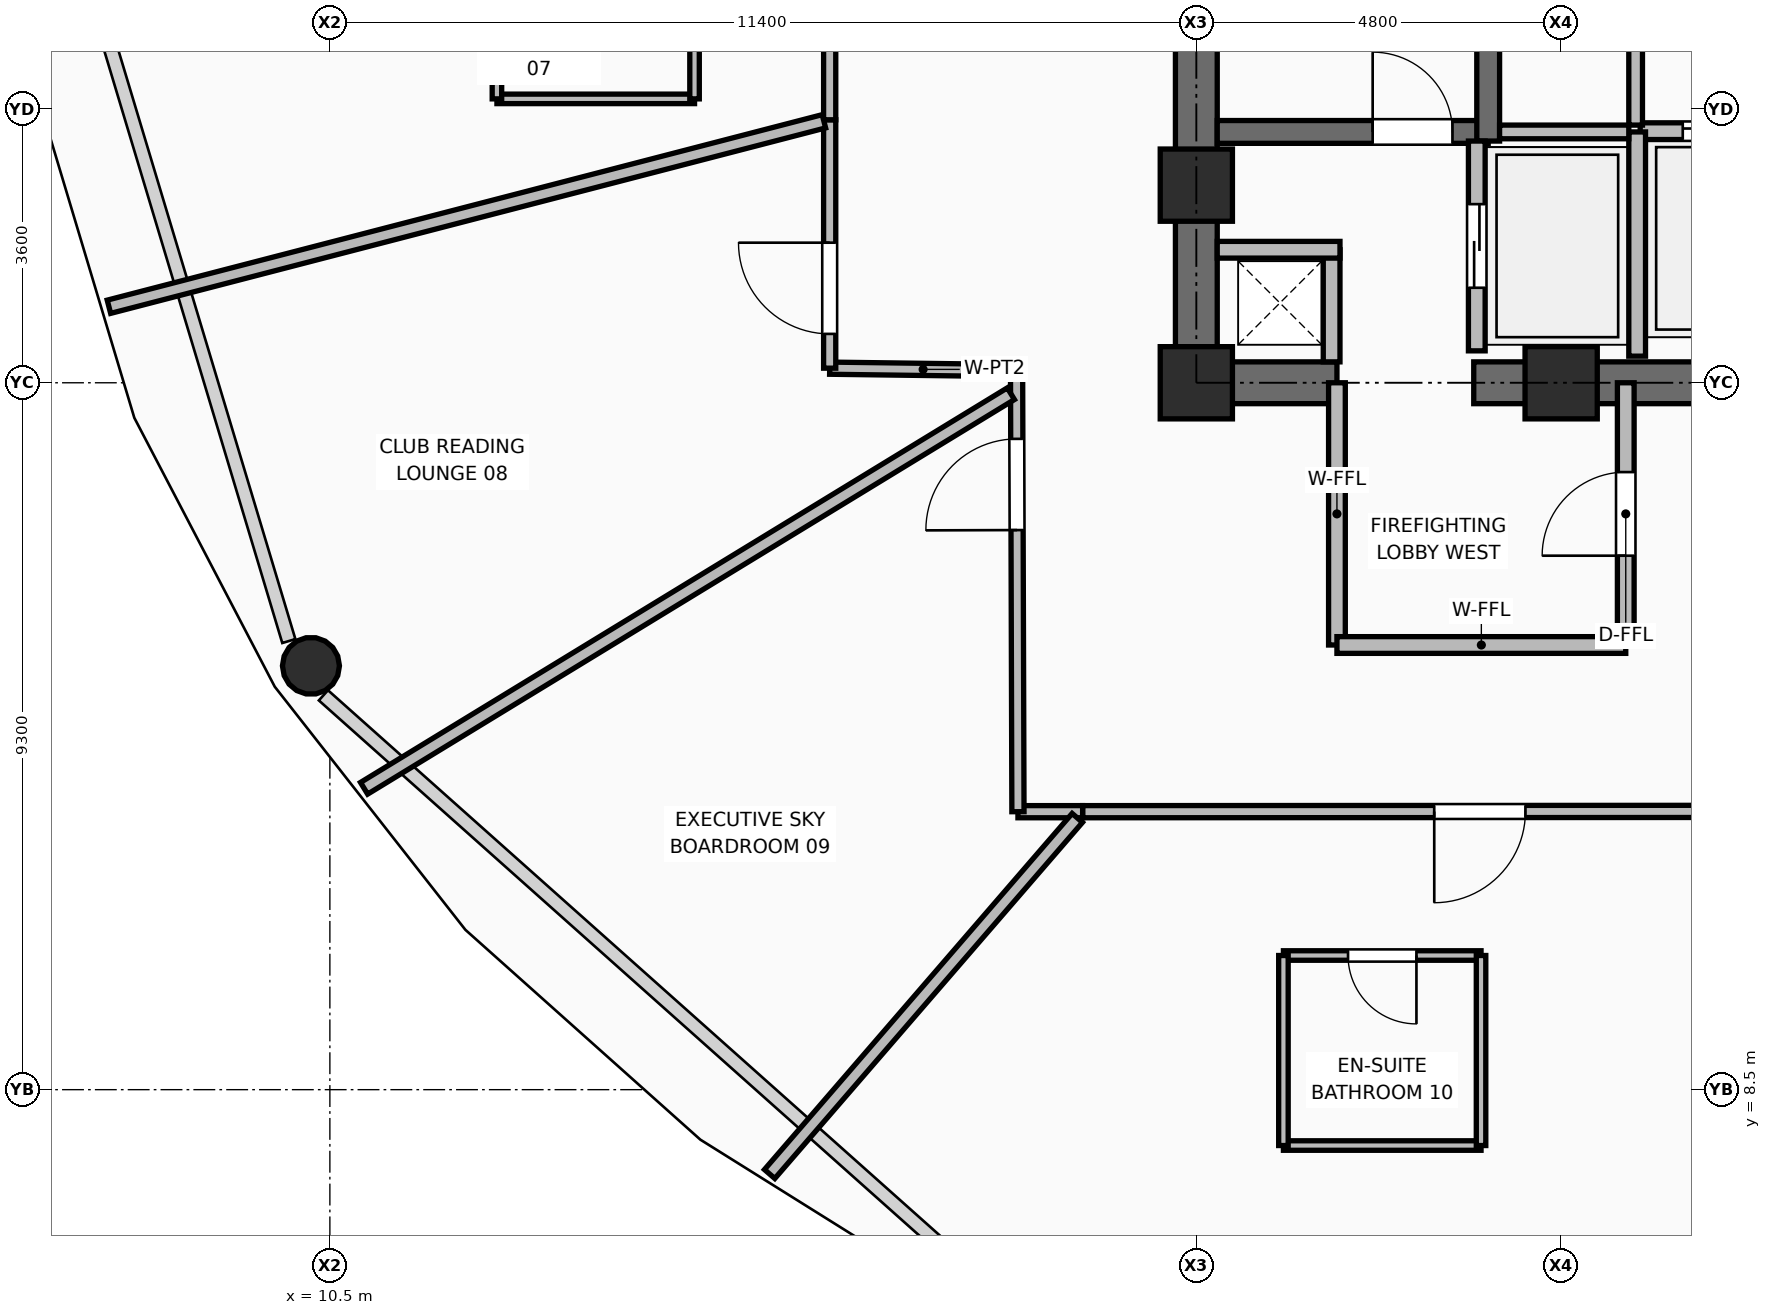
"""IFC4 building model, lengths in metres.
Left out: names, types, materials, properties, quantities, classifications, styles, units other than length and angle.
Written with IfcOpenShell. Run it as: python <this file> out.ifc"""

import sys

from ifc_helpers import new_model, si_unit, direction, frame, frame_2d, origin, origin_2d, place, context, subcontext, project, spatial, rectangle, hollow_circle, extrude, element, fill, save


model = new_model("IFC4")
c1 = context("Model", 3, precision=1e-05, world=origin(), true_north=direction((0.0, 1.0)))
c2 = subcontext(c1, "Body", "Model", "MODEL_VIEW")
j1 = project(units=[si_unit("LENGTHUNIT", "METRE"), si_unit("PLANEANGLEUNIT", "RADIAN")], contexts=[c1])
p1 = place(None, origin())
s1 = spatial("IfcSite", under=j1, at=p1, CompositionType="ELEMENT")
p2 = place(p1, origin())
s2 = spatial("IfcBuilding", under=s1, at=p2, CompositionType="ELEMENT")
p3 = place(p2, frame((0.0, 0.0, 168.45)))
s3 = spatial("IfcBuildingStorey", under=s2, at=p3, CompositionType="ELEMENT", Elevation=168.45)
for number, where, z_axis, x_axis in (
    (1, (21.9, 17.8, 0.0), (0.0, 0.0, 1.0), (1.0, 0.0, 0.0)),
    (2, (26.7, 17.8, 0.0), (0.0, 0.0, 1.0), (1.0, 0.0, 0.0)),
    (3, (21.9, 20.4, 0.0), (0.0, 0.0, 1.0), (1.0, 0.0, 0.0)),
):
    element("IfcColumn", number, at=place(p3, frame(where, z_axis=z_axis, x_axis=x_axis)), inside=s3, PredefinedType="COLUMN", context=c2, shape_type="SweptSolid", body=[
        extrude(rectangle(XDim=0.95, YDim=0.95, at=origin_2d()), origin(), (0.0, 0.0, 1.0), 3.75),
    ])
p4 = place(p3, frame((10.251, 14.076, 0.0), z_axis=(0.0, 0.0, 1.0), x_axis=(1.0, 0.0, 0.0)))
e4 = element("IfcColumn", 4, at=p4, inside=s3, PredefinedType="COLUMN", context=c2, shape_type="SweptSolid", body=[
    extrude(hollow_circle(Radius=0.375, WallThickness=0.035, at=origin_2d()), origin(), (0.0, 0.0, 1.0), 3.57),
])
p5 = place(p3, frame((21.625, 17.8, 0.0), z_axis=(0.0, 0.0, 1.0), x_axis=(1.0, 0.0, 0.0)))
e5 = element("IfcWall", 5, at=p5, inside=s3, PredefinedType="SHEAR", context=c2, shape_type="SweptSolid", body=[
    extrude(rectangle(XDim=2.125, YDim=0.55, at=frame_2d((1.062, 0.0))), origin(), (0.0, 0.0, 1.0), 3.57),
])
p6 = place(p3, frame((25.55, 17.8, 0.0), z_axis=(0.0, 0.0, 1.0), x_axis=(1.0, 0.0, 0.0)))
e6 = element("IfcWall", 6, at=p6, inside=s3, PredefinedType="SHEAR", context=c2, shape_type="SweptSolid", body=[
    extrude(rectangle(XDim=6.9, YDim=0.55, at=frame_2d((3.45, 0.0))), origin(), (0.0, 0.0, 1.0), 3.57),
])
p7 = place(p3, frame((21.9, 18.075, 0.0), z_axis=(0.0, 0.0, 1.0), x_axis=(0.0, 1.0, 0.0)))
e7 = element("IfcWall", 7, at=p7, inside=s3, PredefinedType="SHEAR", context=c2, shape_type="SweptSolid", body=[
    extrude(rectangle(XDim=14.1, YDim=0.55, at=frame_2d((7.05, 0.0))), origin(), (0.0, 0.0, 1.0), 3.57),
])
p8 = place(p3, frame((22.175, 21.1, 0.0), z_axis=(0.0, 0.0, 1.0), x_axis=(1.0, 0.0, 0.0)))
e8 = element("IfcWall", 8, at=p8, inside=s3, PredefinedType="SHEAR", context=c2, shape_type="SweptSolid", body=[
    extrude(rectangle(XDim=3.565, YDim=0.3, at=frame_2d((1.782, 0.0))), origin(), (0.0, 0.0, 1.0), 3.57),
])
p9 = place(p8, frame((2.045, 0.0, 0.0)))
e9 = element("IfcOpeningElement", 9, at=p9, cuts=e8, PredefinedType="OPENING", context=c2, shape_type="SweptSolid", body=[
    extrude(rectangle(XDim=1.05, YDim=2.1, at=frame_2d((0.525, 1.05))), frame((0.0, 0.16, 0.0), z_axis=(0.0, -1.0, 0.0), x_axis=(1.0, 0.0, 0.0)), (0.0, 0.0, 1.0), 0.32),
])
p10 = place(p3, frame((25.74, 20.98, 0.0), z_axis=(0.0, 0.0, 1.0), x_axis=(0.0, 1.0, 0.0)))
e10 = element("IfcWall", 10, at=p10, inside=s3, PredefinedType="SHEAR", context=c2, shape_type="SweptSolid", body=[
    extrude(rectangle(XDim=7.99, YDim=0.3, at=frame_2d((3.995, 0.0))), origin(), (0.0, 0.0, 1.0), 3.57),
])
p11 = place(p3, frame((23.68, 18.075, 0.0), z_axis=(0.0, 0.0, 1.0), x_axis=(0.0, 1.0, 0.0)))
e11 = element("IfcWall", 11, at=p11, inside=s3, PredefinedType="PARTITIONING", context=c2, shape_type="SweptSolid", body=[
    extrude(rectangle(XDim=1.475, YDim=0.22, at=frame_2d((0.738, 0.0))), origin(), (0.0, 0.0, 1.0), 3.55),
])
p12 = place(p3, frame((22.175, 19.55, 0.0), z_axis=(0.0, 0.0, 1.0), x_axis=(1.0, 0.0, 0.0)))
e12 = element("IfcWall", 12, at=p12, inside=s3, PredefinedType="PARTITIONING", context=c2, shape_type="SweptSolid", body=[
    extrude(rectangle(XDim=1.615, YDim=0.22, at=frame_2d((0.808, 0.0))), origin(), (0.0, 0.0, 1.0), 2.595),
])
p13 = place(p3, frame((25.59, 18.22, 0.0), z_axis=(0.0, 0.0, 1.0), x_axis=(0.0, 1.0, 0.0)))
e13 = element("IfcWall", 13, at=p13, inside=s3, PredefinedType="PARTITIONING", context=c2, shape_type="SweptSolid", body=[
    extrude(rectangle(XDim=2.76, YDim=0.22, at=frame_2d((1.38, 0.0))), origin(), (0.0, 0.0, 1.0), 3.55),
])
p14 = place(p13, frame((0.83, 0.0, 0.0)))
e14 = element("IfcOpeningElement", 14, at=p14, cuts=e13, PredefinedType="OPENING", context=c2, shape_type="SweptSolid", body=[
    extrude(rectangle(XDim=1.1, YDim=2.2, at=frame_2d((0.55, 1.1))), frame((0.0, 0.12, 0.0), z_axis=(0.0, -1.0, 0.0), x_axis=(1.0, 0.0, 0.0)), (0.0, 0.0, 1.0), 0.24),
])
p15 = place(p3, frame((27.74, 21.11, 0.0), z_axis=(0.0, 0.0, 1.0), x_axis=(1.0, 0.0, 0.0)))
e15 = element("IfcWall", 15, at=p15, inside=s3, PredefinedType="PARTITIONING", context=c2, shape_type="SweptSolid", body=[
    extrude(rectangle(XDim=2.22, YDim=0.22, at=frame_2d((1.11, 0.0))), origin(), (0.0, 0.0, 1.0), 3.55),
])
p16 = place(p15, frame((0.56, 0.0, 0.0)))
e16 = element("IfcOpeningElement", 16, at=p16, cuts=e15, PredefinedType="OPENING", context=c2, shape_type="SweptSolid", body=[
    extrude(rectangle(XDim=1.1, YDim=2.2, at=frame_2d((0.55, 1.1))), frame((0.0, 0.12, 0.0), z_axis=(0.0, -1.0, 0.0), x_axis=(1.0, 0.0, 0.0)), (0.0, 0.0, 1.0), 0.24),
])
p17 = place(p3, frame((27.7, 18.15, 0.0), z_axis=(0.0, 0.0, 1.0), x_axis=(0.0, 1.0, 0.0)))
e17 = element("IfcWall", 17, at=p17, inside=s3, PredefinedType="PARTITIONING", context=c2, shape_type="SweptSolid", body=[
    extrude(rectangle(XDim=2.95, YDim=0.22, at=frame_2d((1.475, 0.0))), origin(), (0.0, 0.0, 1.0), 3.55),
])
p18 = place(p3, frame((25.89, 21.1, 0.0), z_axis=(0.0, 0.0, 1.0), x_axis=(1.0, 0.0, 0.0)))
e18 = element("IfcWall", 18, at=p18, inside=s3, PredefinedType="PARTITIONING", context=c2, shape_type="SweptSolid", body=[
    extrude(rectangle(XDim=1.7, YDim=0.18, at=frame_2d((0.85, 0.0))), origin(), (0.0, 0.0, 1.0), 3.55),
])
p19 = place(p3, frame((27.68, 21.19, 0.0), z_axis=(0.0, 0.0, 1.0), x_axis=(0.0, 1.0, 0.0)))
e19 = element("IfcWall", 19, at=p19, inside=s3, PredefinedType="PARTITIONING", context=c2, shape_type="SweptSolid", body=[
    extrude(rectangle(XDim=1.39, YDim=0.18, at=frame_2d((0.695, 0.0))), origin(), (0.0, 0.0, 1.0), 3.55),
])
p20 = place(p3, frame((23.75, 14.35, 0.0), z_axis=(0.0, 0.0, 1.0), x_axis=(0.0, 1.0, 0.0)))
e20 = element("IfcWall", 20, at=p20, inside=s3, PredefinedType="PARTITIONING", context=c2, shape_type="SweptSolid", body=[
    extrude(rectangle(XDim=3.45, YDim=0.22, at=frame_2d((1.725, 0.0))), origin(), (0.0, 0.0, 1.0), 3.006),
])
p21 = place(p3, frame((23.75, 14.35, 0.0), z_axis=(0.0, 0.0, 1.0), x_axis=(1.0, 0.0, 0.0)))
e21 = element("IfcWall", 21, at=p21, inside=s3, PredefinedType="PARTITIONING", context=c2, shape_type="SweptSolid", body=[
    extrude(rectangle(XDim=3.8, YDim=0.22, at=frame_2d((1.9, 0.0))), origin(), (0.0, 0.0, 1.0), 3.55),
])
p22 = place(p3, frame((27.55, 14.35, 0.0), z_axis=(0.0, 0.0, 1.0), x_axis=(0.0, 1.0, 0.0)))
e22 = element("IfcWall", 22, at=p22, inside=s3, PredefinedType="PARTITIONING", context=c2, shape_type="SweptSolid", body=[
    extrude(rectangle(XDim=3.45, YDim=0.22, at=frame_2d((1.725, 0.0))), origin(), (0.0, 0.0, 1.0), 3.006),
])
p23 = place(p22, frame((1.175, 0.0, 0.0)))
e23 = element("IfcOpeningElement", 23, at=p23, cuts=e22, PredefinedType="OPENING", context=c2, shape_type="SweptSolid", body=[
    extrude(rectangle(XDim=1.1, YDim=2.1, at=frame_2d((0.55, 1.05))), frame((0.0, 0.12, 0.0), z_axis=(0.0, -1.0, 0.0), x_axis=(1.0, 0.0, 0.0)), (0.0, 0.0, 1.0), 0.24),
])
p24 = place(p3, frame((31.004, 12.162, 0.0), z_axis=(0.0, 0.0, 1.0), x_axis=(-0.999999883026, -0.000483681451, 0.0)))
e24 = element("IfcWall", 24, at=p24, inside=s3, PredefinedType="PARTITIONING", context=c2, shape_type="SweptSolid", body=[
    extrude(rectangle(XDim=10.6, YDim=0.16, at=frame_2d((5.3, 0.0))), origin(), (0.0, 0.0, 1.0), 3.006),
])
p25 = place(p24, frame((4.774, 0.0, 0.0)))
e25 = element("IfcOpeningElement", 25, at=p25, cuts=e24, PredefinedType="OPENING", context=c2, shape_type="SweptSolid", body=[
    extrude(rectangle(XDim=1.2, YDim=2.1, at=frame_2d((0.6, 1.05))), frame((0.0, 0.09, 0.0), z_axis=(0.0, -1.0, 0.0), x_axis=(1.0, 0.0, 0.0)), (0.0, 0.0, 1.0), 0.18),
])
p26 = place(p3, frame((20.404, 12.157, 0.0), z_axis=(0.0, 0.0, 1.0), x_axis=(-1.0, 0.0, 0.0)))
e26 = element("IfcWall", 26, at=p26, inside=s3, PredefinedType="PARTITIONING", context=c2, shape_type="SweptSolid", body=[
    extrude(rectangle(XDim=0.851, YDim=0.16, at=frame_2d((0.426, 0.0))), origin(), (0.0, 0.0, 1.0), 3.006),
])
p27 = place(p3, frame((19.553, 12.157, 0.0), z_axis=(0.0, 0.0, 1.0), x_axis=(-0.003113283747, 0.99999515372, 0.0)))
e27 = element("IfcWall", 27, at=p27, inside=s3, PredefinedType="PARTITIONING", context=c2, shape_type="SweptSolid", body=[
    extrude(rectangle(XDim=5.803, YDim=0.16, at=frame_2d((2.901, 0.0))), origin(), (0.0, 0.0, 1.0), 3.006),
])
p28 = place(p27, frame((3.705, 0.0, 0.0)))
e28 = element("IfcOpeningElement", 28, at=p28, cuts=e27, PredefinedType="OPENING", context=c2, shape_type="SweptSolid", body=[
    extrude(rectangle(XDim=1.2, YDim=2.1, at=frame_2d((0.6, 1.05))), frame((0.0, 0.09, 0.0), z_axis=(0.0, -1.0, 0.0), x_axis=(1.0, 0.0, 0.0)), (0.0, 0.0, 1.0), 0.18),
])
p29 = place(p3, frame((19.535, 17.96, 0.0), z_axis=(0.0, 0.0, 1.0), x_axis=(-0.999915428104, 0.013005254277, 0.0)))
e29 = element("IfcWall", 29, at=p29, inside=s3, PredefinedType="PARTITIONING", context=c2, shape_type="SweptSolid", body=[
    extrude(rectangle(XDim=2.459, YDim=0.16, at=frame_2d((1.229, 0.0))), origin(), (0.0, 0.0, 1.0), 3.55),
])
p30 = place(p3, frame((17.076, 17.992, 0.0), z_axis=(0.0, 0.0, 1.0), x_axis=(0.0, 1.0, 0.0)))
e30 = element("IfcWall", 30, at=p30, inside=s3, PredefinedType="PARTITIONING", context=c2, shape_type="SweptSolid", body=[
    extrude(rectangle(XDim=3.268, YDim=0.16, at=frame_2d((1.634, 0.0))), origin(), (0.0, 0.0, 1.0), 3.55),
])
p31 = place(p30, frame((0.451, 0.0, 0.0)))
e31 = element("IfcOpeningElement", 31, at=p31, cuts=e30, PredefinedType="OPENING", context=c2, shape_type="SweptSolid", body=[
    extrude(rectangle(XDim=1.2, YDim=2.1, at=frame_2d((0.6, 1.05))), frame((0.0, 0.09, 0.0), z_axis=(0.0, -1.0, 0.0), x_axis=(1.0, 0.0, 0.0)), (0.0, 0.0, 1.0), 0.18),
])
p32 = place(p3, frame((17.076, 21.26, 0.0), z_axis=(0.0, 0.0, 1.0), x_axis=(0.0, 1.0, 0.0)))
e32 = element("IfcWall", 32, at=p32, inside=s3, PredefinedType="PARTITIONING", context=c2, shape_type="SweptSolid", body=[
    extrude(rectangle(XDim=2.598, YDim=0.16, at=frame_2d((1.299, 0.0))), origin(), (0.0, 0.0, 1.0), 3.006),
])
p33 = place(p3, frame((17.0, 21.24, 0.0), z_axis=(0.0, 0.0, 1.0), x_axis=(-0.96796954255, -0.251067649639, 0.0)))
e33 = element("IfcWall", 33, at=p33, inside=s3, PredefinedType="PARTITIONING", context=c2, shape_type="SweptSolid", body=[
    extrude(rectangle(XDim=9.718, YDim=0.18, at=frame_2d((4.859, 0.0))), origin(), (0.0, 0.0, 1.0), 2.852),
])
p34 = place(p3, frame((19.46, 17.656, 0.0), z_axis=(0.0, 0.0, 1.0), x_axis=(-0.853711993856, -0.520745457537, 0.0)))
e34 = element("IfcWall", 34, at=p34, inside=s3, PredefinedType="PARTITIONING", context=c2, shape_type="SweptSolid", body=[
    extrude(rectangle(XDim=9.968, YDim=0.18, at=frame_2d((4.984, 0.0))), origin(), (0.0, 0.0, 1.0), 2.852),
])
p35 = place(p3, frame((20.334, 12.075, 0.0), z_axis=(0.0, 0.0, 1.0), x_axis=(-0.653796426348, -0.756670491624, 0.0)))
e35 = element("IfcWall", 35, at=p35, inside=s3, PredefinedType="PARTITIONING", context=c2, shape_type="SweptSolid", body=[
    extrude(rectangle(XDim=6.192, YDim=0.18, at=frame_2d((3.096, 0.0))), origin(), (0.0, 0.0, 1.0), 2.852),
])
p36 = place(p3, frame((12.698, 21.535, 0.0), z_axis=(0.0, 0.0, 1.0), x_axis=(1.0, 0.0, 0.0)))
e36 = element("IfcWall", 36, at=p36, inside=s3, PredefinedType="PARTITIONING", context=c2, shape_type="SweptSolid", body=[
    extrude(rectangle(XDim=2.6, YDim=0.125, at=frame_2d((1.3, 0.0))), origin(), (0.0, 0.0, 1.0), 3.55),
])
p37 = place(p3, frame((12.698, 21.535, 0.0), z_axis=(0.0, 0.0, 1.0), x_axis=(0.0, 1.0, 0.0)))
e37 = element("IfcWall", 37, at=p37, inside=s3, PredefinedType="PARTITIONING", context=c2, shape_type="SweptSolid", body=[
    extrude(rectangle(XDim=2.5, YDim=0.125, at=frame_2d((1.25, 0.0))), origin(), (0.0, 0.0, 1.0), 3.006),
])
p38 = place(p3, frame((15.298, 21.535, 0.0), z_axis=(0.0, 0.0, 1.0), x_axis=(0.0, 1.0, 0.0)))
e38 = element("IfcWall", 38, at=p38, inside=s3, PredefinedType="PARTITIONING", context=c2, shape_type="SweptSolid", body=[
    extrude(rectangle(XDim=2.5, YDim=0.125, at=frame_2d((1.25, 0.0))), origin(), (0.0, 0.0, 1.0), 3.006),
])
p39 = place(p38, frame((0.8, 0.0, 0.0)))
e39 = element("IfcOpeningElement", 39, at=p39, cuts=e38, PredefinedType="OPENING", context=c2, shape_type="SweptSolid", body=[
    extrude(rectangle(XDim=0.9, YDim=2.1, at=frame_2d((0.45, 1.05))), frame((0.0, 0.073, 0.0), z_axis=(0.0, -1.0, 0.0), x_axis=(1.0, 0.0, 0.0)), (0.0, 0.0, 1.0), 0.145),
])
p40 = place(p3, frame((23.046, 7.765, 0.0), z_axis=(0.0, 0.0, 1.0), x_axis=(1.0, 0.0, 0.0)))
e40 = element("IfcWall", 40, at=p40, inside=s3, PredefinedType="PARTITIONING", context=c2, shape_type="SweptSolid", body=[
    extrude(rectangle(XDim=2.6, YDim=0.125, at=frame_2d((1.3, 0.0))), origin(), (0.0, 0.0, 1.0), 3.55),
])
p41 = place(p3, frame((23.046, 10.265, 0.0), z_axis=(0.0, 0.0, 1.0), x_axis=(1.0, 0.0, 0.0)))
e41 = element("IfcWall", 41, at=p41, inside=s3, PredefinedType="PARTITIONING", context=c2, shape_type="SweptSolid", body=[
    extrude(rectangle(XDim=2.6, YDim=0.125, at=frame_2d((1.3, 0.0))), origin(), (0.0, 0.0, 1.0), 3.55),
])
p42 = place(p41, frame((0.85, 0.0, 0.0)))
e42 = element("IfcOpeningElement", 42, at=p42, cuts=e41, PredefinedType="OPENING", context=c2, shape_type="SweptSolid", body=[
    extrude(rectangle(XDim=0.9, YDim=2.1, at=frame_2d((0.45, 1.05))), frame((0.0, 0.073, 0.0), z_axis=(0.0, -1.0, 0.0), x_axis=(1.0, 0.0, 0.0)), (0.0, 0.0, 1.0), 0.145),
])
for number, where, z_axis, x_axis in (
    (43, (23.046, 7.765, 0.0), (0.0, 0.0, 1.0), (0.0, 1.0, 0.0)),
    (44, (25.646, 7.765, 0.0), (0.0, 0.0, 1.0), (0.0, 1.0, 0.0)),
):
    element("IfcWall", number, at=place(p3, frame(where, z_axis=z_axis, x_axis=x_axis)), inside=s3, PredefinedType="PARTITIONING", context=c2, shape_type="SweptSolid", body=[
        extrude(rectangle(XDim=2.5, YDim=0.125, at=frame_2d((1.25, 0.0))), origin(), (0.0, 0.0, 1.0), 3.55),
    ])
p43 = place(p9, origin())
e45 = element("IfcDoor", 45, at=p43, inside=s3, OperationType="SINGLE_SWING_LEFT", PredefinedType="DOOR", context=c2, shape_type="SweptSolid", body=[
    extrude(rectangle(XDim=1.05, YDim=2.1, at=frame_2d((0.525, 1.05))), frame((0.0, 0.025, 0.0), z_axis=(0.0, -1.0, 0.0), x_axis=(1.0, 0.0, 0.0)), (0.0, 0.0, 1.0), 0.05),
])
fill(e9, e45)
p44 = place(p14, origin())
e46 = element("IfcDoor", 46, at=p44, inside=s3, OperationType="DOUBLE_DOOR_SLIDING", PredefinedType="DOOR", context=c2, shape_type="SweptSolid", body=[
    extrude(rectangle(XDim=1.1, YDim=2.2, at=frame_2d((0.55, 1.1))), frame((0.0, 0.025, 0.0), z_axis=(0.0, -1.0, 0.0), x_axis=(1.0, 0.0, 0.0)), (0.0, 0.0, 1.0), 0.05),
])
fill(e14, e46)
p45 = place(p16, origin())
e47 = element("IfcDoor", 47, at=p45, inside=s3, OperationType="DOUBLE_DOOR_SLIDING", PredefinedType="DOOR", context=c2, shape_type="SweptSolid", body=[
    extrude(rectangle(XDim=1.1, YDim=2.2, at=frame_2d((0.55, 1.1))), frame((0.0, 0.025, 0.0), z_axis=(0.0, -1.0, 0.0), x_axis=(1.0, 0.0, 0.0)), (0.0, 0.0, 1.0), 0.05),
])
fill(e16, e47)
p46 = place(p23, origin())
e48 = element("IfcDoor", 48, at=p46, inside=s3, OperationType="SINGLE_SWING_LEFT", PredefinedType="DOOR", context=c2, shape_type="SweptSolid", body=[
    extrude(rectangle(XDim=1.1, YDim=2.1, at=frame_2d((0.55, 1.05))), frame((0.0, 0.025, 0.0), z_axis=(0.0, -1.0, 0.0), x_axis=(1.0, 0.0, 0.0)), (0.0, 0.0, 1.0), 0.05),
])
fill(e23, e48)
p47 = place(p31, origin())
e49 = element("IfcDoor", 49, at=p47, inside=s3, OperationType="SINGLE_SWING_RIGHT", PredefinedType="DOOR", context=c2, shape_type="SweptSolid", body=[
    extrude(rectangle(XDim=1.2, YDim=2.1, at=frame_2d((0.6, 1.05))), frame((0.0, 0.025, 0.0), z_axis=(0.0, -1.0, 0.0), x_axis=(1.0, 0.0, 0.0)), (0.0, 0.0, 1.0), 0.05),
])
fill(e31, e49)
p48 = place(p28, origin())
e50 = element("IfcDoor", 50, at=p48, inside=s3, OperationType="SINGLE_SWING_LEFT", PredefinedType="DOOR", context=c2, shape_type="SweptSolid", body=[
    extrude(rectangle(XDim=1.2, YDim=2.1, at=frame_2d((0.6, 1.05))), frame((0.0, 0.025, 0.0), z_axis=(0.0, -1.0, 0.0), x_axis=(1.0, 0.0, 0.0)), (0.0, 0.0, 1.0), 0.05),
])
fill(e28, e50)
p49 = place(p42, frame((0.9, 0.0, 0.0), z_axis=(0.0, 0.0, 1.0), x_axis=(-1.0, 0.0, 0.0)))
e51 = element("IfcDoor", 51, at=p49, inside=s3, OperationType="SINGLE_SWING_LEFT", PredefinedType="DOOR", context=c2, shape_type="SweptSolid", body=[
    extrude(rectangle(XDim=0.9, YDim=2.1, at=frame_2d((0.45, 1.05))), frame((0.0, 0.025, 0.0), z_axis=(0.0, -1.0, 0.0), x_axis=(1.0, 0.0, 0.0)), (0.0, 0.0, 1.0), 0.05),
])
fill(e42, e51)
p50 = place(p25, origin())
e52 = element("IfcDoor", 52, at=p50, inside=s3, OperationType="SINGLE_SWING_RIGHT", PredefinedType="DOOR", context=c2, shape_type="SweptSolid", body=[
    extrude(rectangle(XDim=1.2, YDim=2.1, at=frame_2d((0.6, 1.05))), frame((0.0, 0.025, 0.0), z_axis=(0.0, -1.0, 0.0), x_axis=(1.0, 0.0, 0.0)), (0.0, 0.0, 1.0), 0.05),
])
fill(e25, e52)
save(model, sys.argv[1])
